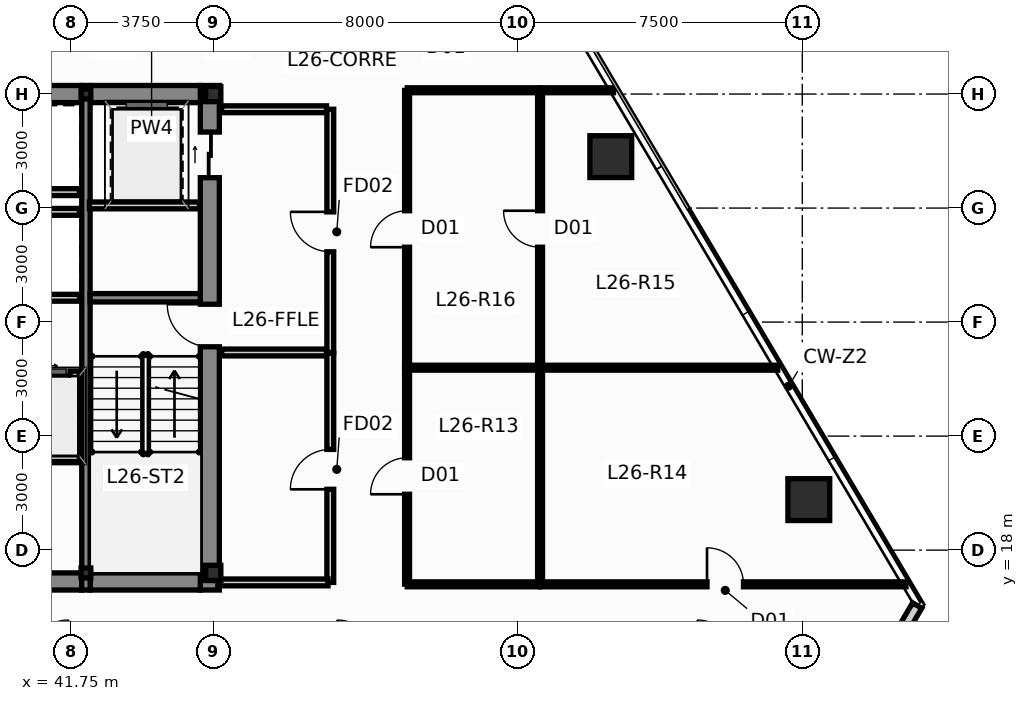
"""IFC4 building model, lengths in metres.
Left out: names, types, materials, properties, quantities, classifications, styles, units other than length and angle.
Written with IfcOpenShell. Run it as: python <this file> out.ifc"""

import sys

from ifc_helpers import new_model, si_unit, direction, frame, frame_2d, origin, origin_2d, place, context, subcontext, project, spatial, rectangle, hollow_rectangle, i_section, extrude, source, transform, mapped, element, fill, save


model = new_model("IFC4")
c1 = context("Model", 3, precision=1e-05, world=origin(), true_north=direction((0.0, 1.0)))
c2 = subcontext(c1, "Body", "Model", "MODEL_VIEW")
j1 = project(units=[si_unit("LENGTHUNIT", "METRE"), si_unit("PLANEANGLEUNIT", "RADIAN")], contexts=[c1])
p1 = place(None, origin())
s1 = spatial("IfcSite", under=j1, at=p1, CompositionType="ELEMENT")
p2 = place(p1, origin())
s2 = spatial("IfcBuilding", under=s1, at=p2, CompositionType="ELEMENT")
p3 = place(p2, frame((0.0, 0.0, 101.75)))
s3 = spatial("IfcBuildingStorey", under=s2, at=p3, CompositionType="ELEMENT", Elevation=101.75)
m1 = source(origin(), c2, "Body", "SweptSolid", [
    extrude(i_section(OverallWidth=0.4, OverallDepth=0.4, WebThickness=0.02, FlangeThickness=0.032, at=origin_2d()), origin(), (0.0, 0.0, 1.0), 3.65),
])
for number, where, z_axis, x_axis in (
    (1, (45.5, 17.4, 0.0), (0.0, 0.0, 1.0), (1.0, 0.0, 0.0)),
    (2, (45.5, 30.0, 0.0), (0.0, 0.0, 1.0), (1.0, 0.0, 0.0)),
):
    element("IfcColumn", number, at=place(p3, frame(where, z_axis=z_axis, x_axis=x_axis)), inside=s3, PredefinedType="COLUMN", context=c2, shape_type="MappedRepresentation", body=[
        mapped(m1, transform((0.0, 0.0, 0.0), scale=1.0)),
    ])
m2 = source(origin(), c2, "Body", "SweptSolid", [
    extrude(i_section(OverallWidth=0.256, OverallDepth=0.26, WebThickness=0.01, FlangeThickness=0.017, at=origin_2d()), origin(), (0.0, 0.0, 1.0), 3.65),
])
for number, where, z_axis, x_axis in (
    (3, (42.15, 17.4, 0.0), (0.0, 0.0, 1.0), (1.0, 0.0, 0.0)),
    (4, (42.15, 30.0, 0.0), (0.0, 0.0, 1.0), (1.0, 0.0, 0.0)),
):
    element("IfcColumn", number, at=place(p3, frame(where, z_axis=z_axis, x_axis=x_axis)), inside=s3, PredefinedType="COLUMN", context=c2, shape_type="MappedRepresentation", body=[
        mapped(m2, transform((0.0, 0.0, 0.0), scale=1.0)),
    ])
p4 = place(p3, frame((45.41, 16.95, 0.0), z_axis=(0.0, 0.0, 1.0), x_axis=(0.0, 1.0, 0.0)))
e5 = element("IfcWall", 5, at=p4, inside=s3, PredefinedType="SHEAR", context=c2, shape_type="SweptSolid", body=[
    extrude(rectangle(XDim=13.275, YDim=0.5, at=frame_2d((6.638, 0.0))), origin(), (0.0, 0.0, 1.0), 3.65),
])
p5 = place(p4, frame((6.4, 0.0, 0.0)))
e6 = element("IfcOpeningElement", 6, at=p5, cuts=e5, PredefinedType="OPENING", context=c2, shape_type="SweptSolid", body=[
    extrude(rectangle(XDim=1.12, YDim=2.15, at=frame_2d((0.56, 1.075))), frame((0.0, 0.262, 0.0), z_axis=(0.0, -1.0, 0.0), x_axis=(1.0, 0.0, 0.0)), (0.0, 0.0, 1.0), 0.524),
])
p6 = place(p4, frame((10.85, 0.0, 0.0)))
e7 = element("IfcOpeningElement", 7, at=p6, cuts=e5, PredefinedType="OPENING", context=c2, shape_type="SweptSolid", body=[
    extrude(rectangle(XDim=1.2, YDim=2.2, at=frame_2d((0.6, 1.1))), frame((0.0, 0.262, 0.0), z_axis=(0.0, -1.0, 0.0), x_axis=(1.0, 0.0, 0.0)), (0.0, 0.0, 1.0), 0.524),
])
p7 = place(p3, frame((33.96, 17.175, 0.0), z_axis=(0.0, 0.0, 1.0), x_axis=(1.0, 0.0, 0.0)))
e8 = element("IfcWall", 8, at=p7, inside=s3, PredefinedType="SHEAR", context=c2, shape_type="SweptSolid", body=[
    extrude(rectangle(XDim=8.08, YDim=0.45, at=frame_2d((4.04, 0.0))), origin(), (0.0, 0.0, 1.0), 3.65),
])
p8 = place(p3, frame((42.26, 17.175, 0.0), z_axis=(0.0, 0.0, 1.0), x_axis=(1.0, 0.0, 0.0)))
e9 = element("IfcWall", 9, at=p8, inside=s3, PredefinedType="SHEAR", context=c2, shape_type="SweptSolid", body=[
    extrude(rectangle(XDim=2.9, YDim=0.45, at=frame_2d((1.45, 0.0))), origin(), (0.0, 0.0, 1.0), 3.65),
])
p9 = place(p3, frame((40.16, 30.0, 0.0), z_axis=(0.0, 0.0, 1.0), x_axis=(1.0, 0.0, 0.0)))
e10 = element("IfcWall", 10, at=p9, inside=s3, PredefinedType="SHEAR", context=c2, shape_type="SweptSolid", body=[
    extrude(rectangle(XDim=1.88, YDim=0.45, at=frame_2d((0.94, 0.0))), origin(), (0.0, 0.0, 1.0), 3.65),
])
p10 = place(p3, frame((42.26, 30.0, 0.0), z_axis=(0.0, 0.0, 1.0), x_axis=(1.0, 0.0, 0.0)))
e11 = element("IfcWall", 11, at=p10, inside=s3, PredefinedType="SHEAR", context=c2, shape_type="SweptSolid", body=[
    extrude(rectangle(XDim=2.9, YDim=0.45, at=frame_2d((1.45, 0.0))), origin(), (0.0, 0.0, 1.0), 3.65),
])
p11 = place(p3, frame((42.15, 16.95, 0.0), z_axis=(0.0, 0.0, 1.0), x_axis=(0.0, 1.0, 0.0)))
e12 = element("IfcWall", 12, at=p11, inside=s3, PredefinedType="SHEAR", context=c2, shape_type="SweptSolid", body=[
    extrude(rectangle(XDim=13.275, YDim=0.22, at=frame_2d((6.638, 0.0))), origin(), (0.0, 0.0, 1.0), 3.65),
])
p12 = place(p3, frame((42.26, 24.64, 0.0), z_axis=(0.0, 0.0, 1.0), x_axis=(1.0, 0.0, 0.0)))
e13 = element("IfcWall", 13, at=p12, inside=s3, PredefinedType="SHEAR", context=c2, shape_type="SweptSolid", body=[
    extrude(rectangle(XDim=2.9, YDim=0.22, at=frame_2d((1.45, 0.0))), origin(), (0.0, 0.0, 1.0), 3.65),
])
m3 = source(origin(), c2, "Body", "SweptSolid", [
    extrude(hollow_rectangle(XDim=1.1, YDim=1.1, WallThickness=0.06, at=origin_2d()), origin(), (0.0, 0.0, 1.0), 3.651),
])
p13 = place(p3, frame((61.171, 19.329, 0.0), z_axis=(-0.010431780378, -0.021599135014, 0.999712286273), x_axis=(0.900476348161, -0.434904985489, 0.0)))
e14 = element("IfcColumn", 14, at=p13, inside=s3, PredefinedType="COLUMN", context=c2, shape_type="MappedRepresentation", body=[
    mapped(m3, transform((0.0, 0.0, 0.0), scale=1.0)),
])
m4 = source(origin(), c2, "Body", "SweptSolid", [
    extrude(hollow_rectangle(XDim=1.1, YDim=1.1, WallThickness=0.06, at=origin_2d()), origin(), (0.0, 0.0, 1.0), 3.651),
])
p14 = place(p3, frame((55.961, 28.354, 0.0), z_axis=(-0.014913299626, -0.013843287097, 0.999792957015), x_axis=(0.680325028146, -0.732910537568, 0.0)))
e15 = element("IfcColumn", 15, at=p14, inside=s3, PredefinedType="COLUMN", context=c2, shape_type="MappedRepresentation", body=[
    mapped(m4, transform((0.0, 0.0, 0.0), scale=1.0)),
])
p15 = place(p3, frame((64.023, 16.542, 0.0), z_axis=(0.0, 0.0, 1.0), x_axis=(-0.505503431039, -0.862824594694, 0.0)))
e16 = element("IfcWall", 16, at=p15, inside=s3, PredefinedType="STANDARD", context=c2, shape_type="SweptSolid", body=[
    extrude(rectangle(XDim=13.253, YDim=0.28, at=frame_2d((6.626, 0.0))), origin(), (0.0, 0.0, 1.0), 3.4),
])
p16 = place(p15, frame((6.63, 0.0, 0.9)))
e17 = element("IfcOpeningElement", 17, at=p16, cuts=e16, PredefinedType="OPENING", context=c2, shape_type="SweptSolid", body=[
    extrude(rectangle(XDim=1.8, YDim=1.8, at=frame_2d((0.9, 0.9))), frame((0.0, 0.152, 0.0), z_axis=(0.0, -1.0, 0.0), x_axis=(1.0, 0.0, 0.0)), (0.0, 0.0, 1.0), 0.304),
])
p17 = place(p3, frame((40.28, 22.62, 0.0), z_axis=(0.0, 0.0, 1.0), x_axis=(1.0, 0.0, 0.0)))
e18 = element("IfcWall", 18, at=p17, inside=s3, PredefinedType="PARTITIONING", context=c2, shape_type="SweptSolid", body=[
    extrude(rectangle(XDim=1.7, YDim=0.18, at=frame_2d((0.85, 0.0))), origin(), (0.0, 0.0, 1.0), 3.4),
])
p18 = place(p17, frame((0.35, 0.0, 0.0)))
e19 = element("IfcOpeningElement", 19, at=p18, cuts=e18, PredefinedType="OPENING", context=c2, shape_type="SweptSolid", body=[
    extrude(rectangle(XDim=1.1, YDim=2.2, at=frame_2d((0.55, 1.1))), frame((0.0, 0.102, 0.0), z_axis=(0.0, -1.0, 0.0), x_axis=(1.0, 0.0, 0.0)), (0.0, 0.0, 1.0), 0.204),
])
p19 = place(p3, frame((40.28, 26.9, 0.0), z_axis=(0.0, 0.0, 1.0), x_axis=(1.0, 0.0, 0.0)))
e20 = element("IfcWall", 20, at=p19, inside=s3, PredefinedType="PARTITIONING", context=c2, shape_type="SweptSolid", body=[
    extrude(rectangle(XDim=1.7, YDim=0.18, at=frame_2d((0.85, 0.0))), origin(), (0.0, 0.0, 1.0), 3.4),
])
p20 = place(p3, frame((40.2, 24.64, 0.0), z_axis=(0.0, 0.0, 1.0), x_axis=(1.0, 0.0, 0.0)))
e21 = element("IfcWall", 21, at=p20, inside=s3, PredefinedType="PARTITIONING", context=c2, shape_type="SweptSolid", body=[
    extrude(rectangle(XDim=1.78, YDim=0.18, at=frame_2d((0.89, 0.0))), origin(), (0.0, 0.0, 1.0), 3.4),
])
p21 = place(p3, frame((40.22, 27.42, 0.0), z_axis=(0.0, 0.0, 1.0), x_axis=(1.0, 0.0, 0.0)))
e22 = element("IfcWall", 22, at=p21, inside=s3, PredefinedType="PARTITIONING", context=c2, shape_type="SweptSolid", body=[
    extrude(rectangle(XDim=1.76, YDim=0.18, at=frame_2d((0.88, 0.0))), origin(), (0.0, 0.0, 1.0), 3.4),
])
p22 = place(p3, frame((48.58, 23.2, 0.0), z_axis=(0.0, 0.0, 1.0), x_axis=(0.0, 1.0, 0.0)))
e23 = element("IfcWall", 23, at=p22, inside=s3, PredefinedType="PARTITIONING", context=c2, shape_type="SweptSolid", body=[
    extrude(rectangle(XDim=6.4, YDim=0.18, at=frame_2d((3.2, 0.0))), origin(), (0.0, 0.0, 1.0), 3.026),
])
p23 = place(p22, frame((2.65, 0.0, 0.0)))
e24 = element("IfcOpeningElement", 24, at=p23, cuts=e23, PredefinedType="OPENING", context=c2, shape_type="SweptSolid", body=[
    extrude(rectangle(XDim=1.05, YDim=2.15, at=frame_2d((0.525, 1.075))), frame((0.0, 0.102, 0.0), z_axis=(0.0, -1.0, 0.0), x_axis=(1.0, 0.0, 0.0)), (0.0, 0.0, 1.0), 0.204),
])
p24 = place(p3, frame((45.72, 23.2, 0.0), z_axis=(0.0, 0.0, 1.0), x_axis=(1.0, 0.0, 0.0)))
e25 = element("IfcWall", 25, at=p24, inside=s3, PredefinedType="PARTITIONING", context=c2, shape_type="SweptSolid", body=[
    extrude(rectangle(XDim=2.76, YDim=0.18, at=frame_2d((1.38, 0.0))), origin(), (0.0, 0.0, 1.0), 3.4),
])
p25 = place(p3, frame((45.72, 29.6, 0.0), z_axis=(0.0, 0.0, 1.0), x_axis=(1.0, 0.0, 0.0)))
e26 = element("IfcWall", 26, at=p25, inside=s3, PredefinedType="PARTITIONING", context=c2, shape_type="SweptSolid", body=[
    extrude(rectangle(XDim=2.76, YDim=0.18, at=frame_2d((1.38, 0.0))), origin(), (0.0, 0.0, 1.0), 2.783),
])
p26 = place(p3, frame((42.24, 27.07, 0.0), z_axis=(0.0, 0.0, 1.0), x_axis=(1.0, 0.0, 0.0)))
e27 = element("IfcWall", 27, at=p26, inside=s3, PredefinedType="PARTITIONING", context=c2, shape_type="SweptSolid", body=[
    extrude(rectangle(XDim=2.9, YDim=0.18, at=frame_2d((1.45, 0.0))), origin(), (0.0, 0.0, 1.0), 3.4),
])
p27 = place(p3, frame((40.22, 20.42, 0.0), z_axis=(0.0, 0.0, 1.0), x_axis=(1.0, 0.0, 0.0)))
e28 = element("IfcWall", 28, at=p27, inside=s3, PredefinedType="PARTITIONING", context=c2, shape_type="SweptSolid", body=[
    extrude(rectangle(XDim=1.76, YDim=0.18, at=frame_2d((0.88, 0.0))), origin(), (0.0, 0.0, 1.0), 3.4),
])
p28 = place(p3, frame((48.58, 17.15, 0.0), z_axis=(0.0, 0.0, 1.0), x_axis=(0.0, 1.0, 0.0)))
e29 = element("IfcWall", 29, at=p28, inside=s3, PredefinedType="PARTITIONING", context=c2, shape_type="SweptSolid", body=[
    extrude(rectangle(XDim=6.03, YDim=0.18, at=frame_2d((3.015, 0.0))), origin(), (0.0, 0.0, 1.0), 3.026),
])
p29 = place(p28, frame((2.45, 0.0, 0.0)))
e30 = element("IfcOpeningElement", 30, at=p29, cuts=e29, PredefinedType="OPENING", context=c2, shape_type="SweptSolid", body=[
    extrude(rectangle(XDim=1.05, YDim=2.15, at=frame_2d((0.525, 1.075))), frame((0.0, 0.102, 0.0), z_axis=(0.0, -1.0, 0.0), x_axis=(1.0, 0.0, 0.0)), (0.0, 0.0, 1.0), 0.204),
])
p30 = place(p3, frame((45.62, 17.15, 0.0), z_axis=(0.0, 0.0, 1.0), x_axis=(1.0, 0.0, 0.0)))
e31 = element("IfcWall", 31, at=p30, inside=s3, PredefinedType="PARTITIONING", context=c2, shape_type="SweptSolid", body=[
    extrude(rectangle(XDim=2.9, YDim=0.18, at=frame_2d((1.45, 0.0))), origin(), (0.0, 0.0, 1.0), 2.783),
])
p31 = place(p3, frame((54.105, 17.1, 0.0), z_axis=(0.0, 0.0, 1.0), x_axis=(1.0, 0.0, 0.0)))
e32 = element("IfcWall", 32, at=p31, inside=s3, PredefinedType="PARTITIONING", context=c2, shape_type="SweptSolid", body=[
    extrude(rectangle(XDim=9.624, YDim=0.13, at=frame_2d((4.812, 0.0))), origin(), (0.0, 0.0, 1.0), 3.4),
])
p32 = place(p31, frame((4.388, 0.0, 0.0)))
e33 = element("IfcOpeningElement", 33, at=p32, cuts=e32, PredefinedType="OPENING", context=c2, shape_type="SweptSolid", body=[
    extrude(rectangle(XDim=0.96, YDim=2.15, at=frame_2d((0.48, 1.075))), frame((0.0, 0.077, 0.0), z_axis=(0.0, -1.0, 0.0), x_axis=(1.0, 0.0, 0.0)), (0.0, 0.0, 1.0), 0.154),
])
p33 = place(p3, frame((50.6, 22.805, 0.0), z_axis=(0.0, 0.0, 1.0), x_axis=(0.0, 1.0, 0.0)))
e34 = element("IfcWall", 34, at=p33, inside=s3, PredefinedType="PARTITIONING", context=c2, shape_type="SweptSolid", body=[
    extrude(rectangle(XDim=7.29, YDim=0.13, at=frame_2d((3.645, 0.0))), origin(), (0.0, 0.0, 1.0), 3.026),
])
p34 = place(p33, frame((3.165, 0.0, 0.0)))
e35 = element("IfcOpeningElement", 35, at=p34, cuts=e34, PredefinedType="OPENING", context=c2, shape_type="SweptSolid", body=[
    extrude(rectangle(XDim=0.96, YDim=2.15, at=frame_2d((0.48, 1.075))), frame((0.0, 0.077, 0.0), z_axis=(0.0, -1.0, 0.0), x_axis=(1.0, 0.0, 0.0)), (0.0, 0.0, 1.0), 0.154),
])
p35 = place(p3, frame((54.1, 22.805, 0.0), z_axis=(0.0, 0.0, 1.0), x_axis=(0.0, 1.0, 0.0)))
e36 = element("IfcWall", 36, at=p35, inside=s3, PredefinedType="PARTITIONING", context=c2, shape_type="SweptSolid", body=[
    extrude(rectangle(XDim=7.29, YDim=0.13, at=frame_2d((3.645, 0.0))), origin(), (0.0, 0.0, 1.0), 3.026),
])
p36 = place(p35, frame((3.165, 0.0, 0.0)))
e37 = element("IfcOpeningElement", 37, at=p36, cuts=e36, PredefinedType="OPENING", context=c2, shape_type="SweptSolid", body=[
    extrude(rectangle(XDim=0.96, YDim=2.15, at=frame_2d((0.48, 1.075))), frame((0.0, 0.077, 0.0), z_axis=(0.0, -1.0, 0.0), x_axis=(1.0, 0.0, 0.0)), (0.0, 0.0, 1.0), 0.154),
])
p37 = place(p3, frame((54.105, 22.8, 0.0), z_axis=(0.0, 0.0, 1.0), x_axis=(1.0, 0.0, 0.0)))
e38 = element("IfcWall", 38, at=p37, inside=s3, PredefinedType="PARTITIONING", context=c2, shape_type="SweptSolid", body=[
    extrude(rectangle(XDim=6.249, YDim=0.13, at=frame_2d((3.125, 0.0))), origin(), (0.0, 0.0, 1.0), 3.4),
])
p38 = place(p3, frame((50.6, 17.105, 0.0), z_axis=(0.0, 0.0, 1.0), x_axis=(0.0, 1.0, 0.0)))
e39 = element("IfcWall", 39, at=p38, inside=s3, PredefinedType="PARTITIONING", context=c2, shape_type="SweptSolid", body=[
    extrude(rectangle(XDim=5.69, YDim=0.13, at=frame_2d((2.845, 0.0))), origin(), (0.0, 0.0, 1.0), 3.026),
])
p39 = place(p38, frame((2.365, 0.0, 0.0)))
e40 = element("IfcOpeningElement", 40, at=p39, cuts=e39, PredefinedType="OPENING", context=c2, shape_type="SweptSolid", body=[
    extrude(rectangle(XDim=0.96, YDim=2.15, at=frame_2d((0.48, 1.075))), frame((0.0, 0.077, 0.0), z_axis=(0.0, -1.0, 0.0), x_axis=(1.0, 0.0, 0.0)), (0.0, 0.0, 1.0), 0.154),
])
p40 = place(p3, frame((54.1, 17.105, 0.0), z_axis=(0.0, 0.0, 1.0), x_axis=(0.0, 1.0, 0.0)))
e41 = element("IfcWall", 41, at=p40, inside=s3, PredefinedType="PARTITIONING", context=c2, shape_type="SweptSolid", body=[
    extrude(rectangle(XDim=5.69, YDim=0.13, at=frame_2d((2.845, 0.0))), origin(), (0.0, 0.0, 1.0), 3.026),
])
for number, where, z_axis, x_axis in (
    (42, (50.605, 30.1, 0.0), (0.0, 0.0, 1.0), (1.0, 0.0, 0.0)),
    (43, (54.095, 17.1, 0.0), (0.0, 0.0, 1.0), (-1.0, 0.0, 0.0)),
    (44, (50.605, 22.8, 0.0), (0.0, 0.0, 1.0), (1.0, 0.0, 0.0)),
):
    element("IfcWall", number, at=place(p3, frame(where, z_axis=z_axis, x_axis=x_axis)), inside=s3, PredefinedType="PARTITIONING", context=c2, shape_type="SweptSolid", body=[
        extrude(rectangle(XDim=3.49, YDim=0.13, at=frame_2d((1.745, 0.0))), origin(), (0.0, 0.0, 1.0), 3.4),
    ])
p41 = place(p3, frame((54.105, 30.1, 0.0), z_axis=(0.0, 0.0, 1.0), x_axis=(1.0, 0.0, 0.0)))
e45 = element("IfcWall", 45, at=p41, inside=s3, PredefinedType="PARTITIONING", context=c2, shape_type="SweptSolid", body=[
    extrude(rectangle(XDim=1.928, YDim=0.13, at=frame_2d((0.964, 0.0))), origin(), (0.0, 0.0, 1.0), 3.4),
])
p42 = place(p5, origin())
e46 = element("IfcDoor", 46, at=p42, inside=s3, OperationType="SINGLE_SWING_RIGHT", PredefinedType="DOOR", context=c2, shape_type="SweptSolid", body=[
    extrude(rectangle(XDim=1.12, YDim=2.15, at=frame_2d((0.56, 1.075))), frame((0.0, 0.025, 0.0), z_axis=(0.0, -1.0, 0.0), x_axis=(1.0, 0.0, 0.0)), (0.0, 0.0, 1.0), 0.05),
])
fill(e6, e46)
p43 = place(p6, origin())
e47 = element("IfcDoor", 47, at=p43, inside=s3, OperationType="SLIDING_TO_RIGHT", PredefinedType="DOOR", context=c2, shape_type="SweptSolid", body=[
    extrude(rectangle(XDim=1.2, YDim=2.2, at=frame_2d((0.6, 1.1))), frame((0.0, 0.025, 0.0), z_axis=(0.0, -1.0, 0.0), x_axis=(1.0, 0.0, 0.0)), (0.0, 0.0, 1.0), 0.05),
])
fill(e7, e47)
p44 = place(p18, origin())
e48 = element("IfcDoor", 48, at=p44, inside=s3, OperationType="SLIDING_TO_LEFT", PredefinedType="DOOR", context=c2, shape_type="SweptSolid", body=[
    extrude(rectangle(XDim=1.1, YDim=2.2, at=frame_2d((0.55, 1.1))), frame((0.0, 0.025, 0.0), z_axis=(0.0, -1.0, 0.0), x_axis=(1.0, 0.0, 0.0)), (0.0, 0.0, 1.0), 0.05),
])
fill(e19, e48)
p45 = place(p23, origin())
e49 = element("IfcDoor", 49, at=p45, inside=s3, OperationType="SINGLE_SWING_RIGHT", PredefinedType="DOOR", context=c2, shape_type="SweptSolid", body=[
    extrude(rectangle(XDim=1.05, YDim=2.15, at=frame_2d((0.525, 1.075))), frame((0.0, 0.025, 0.0), z_axis=(0.0, -1.0, 0.0), x_axis=(1.0, 0.0, 0.0)), (0.0, 0.0, 1.0), 0.05),
])
fill(e24, e49)
p46 = place(p29, origin())
e50 = element("IfcDoor", 50, at=p46, inside=s3, OperationType="SINGLE_SWING_LEFT", PredefinedType="DOOR", context=c2, shape_type="SweptSolid", body=[
    extrude(rectangle(XDim=1.05, YDim=2.15, at=frame_2d((0.525, 1.075))), frame((0.0, 0.025, 0.0), z_axis=(0.0, -1.0, 0.0), x_axis=(1.0, 0.0, 0.0)), (0.0, 0.0, 1.0), 0.05),
])
fill(e30, e50)
p47 = place(p32, origin())
e51 = element("IfcDoor", 51, at=p47, inside=s3, OperationType="SINGLE_SWING_LEFT", PredefinedType="DOOR", context=c2, shape_type="SweptSolid", body=[
    extrude(rectangle(XDim=0.96, YDim=2.15, at=frame_2d((0.48, 1.075))), frame((0.0, 0.025, 0.0), z_axis=(0.0, -1.0, 0.0), x_axis=(1.0, 0.0, 0.0)), (0.0, 0.0, 1.0), 0.05),
])
fill(e33, e51)
p48 = place(p34, origin())
e52 = element("IfcDoor", 52, at=p48, inside=s3, OperationType="SINGLE_SWING_LEFT", PredefinedType="DOOR", context=c2, shape_type="SweptSolid", body=[
    extrude(rectangle(XDim=0.96, YDim=2.15, at=frame_2d((0.48, 1.075))), frame((0.0, 0.025, 0.0), z_axis=(0.0, -1.0, 0.0), x_axis=(1.0, 0.0, 0.0)), (0.0, 0.0, 1.0), 0.05),
])
fill(e35, e52)
p49 = place(p36, origin())
e53 = element("IfcDoor", 53, at=p49, inside=s3, OperationType="SINGLE_SWING_RIGHT", PredefinedType="DOOR", context=c2, shape_type="SweptSolid", body=[
    extrude(rectangle(XDim=0.96, YDim=2.15, at=frame_2d((0.48, 1.075))), frame((0.0, 0.025, 0.0), z_axis=(0.0, -1.0, 0.0), x_axis=(1.0, 0.0, 0.0)), (0.0, 0.0, 1.0), 0.05),
])
fill(e37, e53)
p50 = place(p39, origin())
e54 = element("IfcDoor", 54, at=p50, inside=s3, OperationType="SINGLE_SWING_LEFT", PredefinedType="DOOR", context=c2, shape_type="SweptSolid", body=[
    extrude(rectangle(XDim=0.96, YDim=2.15, at=frame_2d((0.48, 1.075))), frame((0.0, 0.025, 0.0), z_axis=(0.0, -1.0, 0.0), x_axis=(1.0, 0.0, 0.0)), (0.0, 0.0, 1.0), 0.05),
])
fill(e40, e54)
save(model, sys.argv[1])
